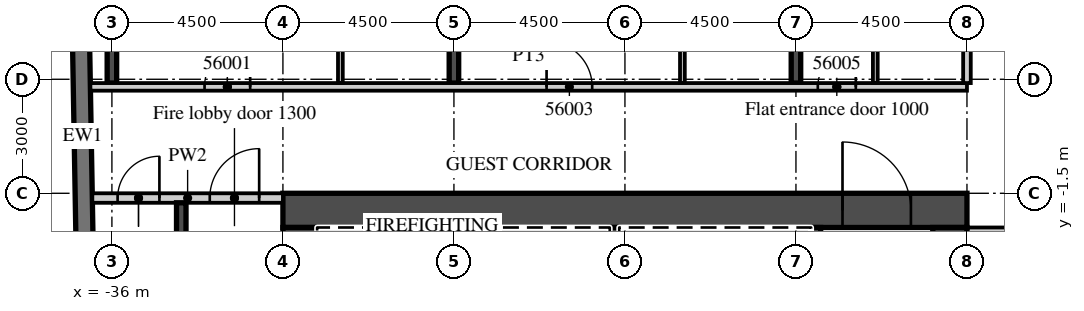
"""IFC4 building model, lengths in metres.
Left out: names, types, materials, properties, quantities, classifications, styles, units other than length and angle.
Written with IfcOpenShell. Run it as: python <this file> out.ifc"""

import sys

from ifc_helpers import new_model, si_unit, direction, frame, frame_2d, origin, place, context, subcontext, project, spatial, rectangle, extrude, element, fill, save


model = new_model("IFC4")
c1 = context("Model", 3, precision=1e-05, world=origin(), true_north=direction((0.0, 1.0)))
c2 = subcontext(c1, "Body", "Model", "MODEL_VIEW")
j1 = project(units=[si_unit("LENGTHUNIT", "METRE"), si_unit("PLANEANGLEUNIT", "RADIAN")], contexts=[c1])
p1 = place(None, origin())
s1 = spatial("IfcSite", under=j1, at=p1, CompositionType="ELEMENT")
p2 = place(p1, origin())
s2 = spatial("IfcBuilding", under=s1, at=p2, CompositionType="ELEMENT")
p3 = place(p2, frame((0.0, 0.0, 230.9)))
s3 = spatial("IfcBuildingStorey", under=s2, at=p3, CompositionType="ELEMENT", Elevation=230.9)
p4 = place(p3, frame((-36.0, 1.4, 0.0), z_axis=(0.0, 0.0, 1.0), x_axis=(0.0, 1.0, 0.0)))
e1 = element("IfcWall", 1, at=p4, inside=s3, PredefinedType="SHEAR", context=c2, shape_type="SweptSolid", body=[
    extrude(rectangle(XDim=17.125, YDim=0.25, at=frame_2d((8.563, 0.0))), origin(), (0.0, 0.0, 1.0), 3.3),
])
p5 = place(p3, frame((-27.0, 1.4, 0.0), z_axis=(0.0, 0.0, 1.0), x_axis=(0.0, 1.0, 0.0)))
e2 = element("IfcWall", 2, at=p5, inside=s3, PredefinedType="SHEAR", context=c2, shape_type="SweptSolid", body=[
    extrude(rectangle(XDim=18.817, YDim=0.25, at=frame_2d((9.409, 0.0))), origin(), (0.0, 0.0, 1.0), 3.3),
])
p6 = place(p3, frame((-18.0, 1.4, 0.0), z_axis=(0.0, 0.0, 1.0), x_axis=(0.0, 1.0, 0.0)))
e3 = element("IfcWall", 3, at=p6, inside=s3, PredefinedType="SHEAR", context=c2, shape_type="SweptSolid", body=[
    extrude(rectangle(XDim=18.974, YDim=0.25, at=frame_2d((9.487, 0.0))), origin(), (0.0, 0.0, 1.0), 3.3),
])
p7 = place(p3, frame((-37.057, 16.503, 0.0), z_axis=(0.0, 0.0, 1.0), x_axis=(0.017452279857, -0.999847697366, 0.0)))
e4 = element("IfcWall", 4, at=p7, inside=s3, PredefinedType="SOLIDWALL", context=c2, shape_type="SweptSolid", body=[
    extrude(rectangle(XDim=33.0, YDim=0.45, at=frame_2d((16.5, 0.0))), origin(), (0.0, 0.0, 1.0), 3.02),
])
p8 = place(p3, frame((-36.566, 1.3, 0.0), z_axis=(0.0, 0.0, 1.0), x_axis=(1.0, 0.0, 0.0)))
e5 = element("IfcWall", 5, at=p8, inside=s3, PredefinedType="PARTITIONING", context=c2, shape_type="SweptSolid", body=[
    extrude(rectangle(XDim=23.066, YDim=0.2, at=frame_2d((11.533, 0.0))), origin(), (0.0, 0.0, 1.0), 3.02),
])
p9 = place(p8, frame((3.004, 0.0, 0.0)))
e6 = element("IfcOpeningElement", 6, at=p9, cuts=e5, PredefinedType="OPENING", context=c2, shape_type="SweptSolid", body=[
    extrude(rectangle(XDim=1.2, YDim=2.1, at=frame_2d((0.6, 1.05))), frame((0.0, 0.11, 0.0), z_axis=(0.0, -1.0, 0.0), x_axis=(1.0, 0.0, 0.0)), (0.0, 0.0, 1.0), 0.22),
])
p10 = place(p8, frame((12.004, 0.0, 0.0)))
e7 = element("IfcOpeningElement", 7, at=p10, cuts=e5, PredefinedType="OPENING", context=c2, shape_type="SweptSolid", body=[
    extrude(rectangle(XDim=1.2, YDim=2.1, at=frame_2d((0.6, 1.05))), frame((0.0, 0.11, 0.0), z_axis=(0.0, -1.0, 0.0), x_axis=(1.0, 0.0, 0.0)), (0.0, 0.0, 1.0), 0.22),
])
p11 = place(p8, frame((19.141, 0.0, 0.0)))
e8 = element("IfcOpeningElement", 8, at=p11, cuts=e5, PredefinedType="OPENING", context=c2, shape_type="SweptSolid", body=[
    extrude(rectangle(XDim=1.0, YDim=2.1, at=frame_2d((0.5, 1.05))), frame((0.0, 0.11, 0.0), z_axis=(0.0, -1.0, 0.0), x_axis=(1.0, 0.0, 0.0)), (0.0, 0.0, 1.0), 0.22),
])
p12 = place(p3, frame((-29.988, 1.4, 0.0), z_axis=(0.0, 0.0, 1.0), x_axis=(0.0, 1.0, 0.0)))
e9 = element("IfcWall", 9, at=p12, inside=s3, PredefinedType="PARTITIONING", context=c2, shape_type="SweptSolid", body=[
    extrude(rectangle(XDim=5.725, YDim=0.125, at=frame_2d((2.863, 0.0))), origin(), (0.0, 0.0, 1.0), 3.02),
])
p13 = place(p12, frame((2.45, 0.0, 0.0)))
e10 = element("IfcOpeningElement", 10, at=p13, cuts=e9, PredefinedType="OPENING", context=c2, shape_type="SweptSolid", body=[
    extrude(rectangle(XDim=0.9, YDim=2.1, at=frame_2d((0.45, 1.05))), frame((0.0, 0.073, 0.0), z_axis=(0.0, -1.0, 0.0), x_axis=(1.0, 0.0, 0.0)), (0.0, 0.0, 1.0), 0.145),
])
p14 = place(p3, frame((-20.988, 1.4, 0.0), z_axis=(0.0, 0.0, 1.0), x_axis=(0.0, 1.0, 0.0)))
e11 = element("IfcWall", 11, at=p14, inside=s3, PredefinedType="PARTITIONING", context=c2, shape_type="SweptSolid", body=[
    extrude(rectangle(XDim=5.725, YDim=0.125, at=frame_2d((2.863, 0.0))), origin(), (0.0, 0.0, 1.0), 3.02),
])
p15 = place(p14, frame((2.45, 0.0, 0.0)))
e12 = element("IfcOpeningElement", 12, at=p15, cuts=e11, PredefinedType="OPENING", context=c2, shape_type="SweptSolid", body=[
    extrude(rectangle(XDim=0.9, YDim=2.1, at=frame_2d((0.45, 1.05))), frame((0.0, 0.073, 0.0), z_axis=(0.0, -1.0, 0.0), x_axis=(1.0, 0.0, 0.0)), (0.0, 0.0, 1.0), 0.145),
])
p16 = place(p3, frame((-13.5, 1.4, 0.0), z_axis=(0.0, 0.0, 1.0), x_axis=(0.0, 1.0, 0.0)))
e13 = element("IfcWall", 13, at=p16, inside=s3, PredefinedType="PARTITIONING", context=c2, shape_type="SweptSolid", body=[
    extrude(rectangle(XDim=19.065, YDim=0.2, at=frame_2d((9.533, 0.0))), origin(), (0.0, 0.0, 1.0), 3.02),
])
p17 = place(p3, frame((-15.912, 1.4, 0.0), z_axis=(0.0, 0.0, 1.0), x_axis=(0.0, 1.0, 0.0)))
e14 = element("IfcWall", 14, at=p17, inside=s3, PredefinedType="PARTITIONING", context=c2, shape_type="SweptSolid", body=[
    extrude(rectangle(XDim=5.725, YDim=0.125, at=frame_2d((2.863, 0.0))), origin(), (0.0, 0.0, 1.0), 3.02),
])
p18 = place(p17, frame((2.45, 0.0, 0.0)))
e15 = element("IfcOpeningElement", 15, at=p18, cuts=e14, PredefinedType="OPENING", context=c2, shape_type="SweptSolid", body=[
    extrude(rectangle(XDim=0.9, YDim=2.1, at=frame_2d((0.45, 1.05))), frame((0.0, 0.073, 0.0), z_axis=(0.0, -1.0, 0.0), x_axis=(1.0, 0.0, 0.0)), (0.0, 0.0, 1.0), 0.145),
])
p19 = place(p3, frame((-13.5, -2.5, 0.0), z_axis=(0.0, 0.0, 1.0), x_axis=(1.0, 0.0, 0.0)))
e16 = element("IfcWall", 16, at=p19, inside=s3, PredefinedType="PARTITIONING", context=c2, shape_type="SweptSolid", body=[
    extrude(rectangle(XDim=27.0, YDim=0.2, at=frame_2d((13.5, 0.0))), origin(), (0.0, 0.0, 1.0), 3.02),
])
p20 = place(p19, frame((2.925, 0.0, 0.0)))
e17 = element("IfcOpeningElement", 17, at=p20, cuts=e16, PredefinedType="OPENING", context=c2, shape_type="SweptSolid", body=[
    extrude(rectangle(XDim=1.0, YDim=2.1, at=frame_2d((0.5, 1.05))), frame((0.0, 0.11, 0.0), z_axis=(0.0, -1.0, 0.0), x_axis=(1.0, 0.0, 0.0)), (0.0, 0.0, 1.0), 0.22),
])
p21 = place(p19, frame((9.863, 0.0, 0.0)))
e18 = element("IfcOpeningElement", 18, at=p21, cuts=e16, PredefinedType="OPENING", context=c2, shape_type="SweptSolid", body=[
    extrude(rectangle(XDim=1.2, YDim=2.1, at=frame_2d((0.6, 1.05))), frame((0.0, 0.11, 0.0), z_axis=(0.0, -1.0, 0.0), x_axis=(1.0, 0.0, 0.0)), (0.0, 0.0, 1.0), 0.22),
])
p22 = place(p19, frame((16.45, 0.0, 0.0)))
e19 = element("IfcOpeningElement", 19, at=p22, cuts=e16, PredefinedType="OPENING", context=c2, shape_type="SweptSolid", body=[
    extrude(rectangle(XDim=1.0, YDim=2.1, at=frame_2d((0.5, 1.05))), frame((0.0, 0.11, 0.0), z_axis=(0.0, -1.0, 0.0), x_axis=(1.0, 0.0, 0.0)), (0.0, 0.0, 1.0), 0.22),
])
p23 = place(p19, frame((20.925, 0.0, 0.0)))
e20 = element("IfcOpeningElement", 20, at=p23, cuts=e16, PredefinedType="OPENING", context=c2, shape_type="SweptSolid", body=[
    extrude(rectangle(XDim=1.0, YDim=2.1, at=frame_2d((0.5, 1.05))), frame((0.0, 0.11, 0.0), z_axis=(0.0, -1.0, 0.0), x_axis=(1.0, 0.0, 0.0)), (0.0, 0.0, 1.0), 0.22),
])
p24 = place(p19, frame((25.425, 0.0, 0.0)))
e21 = element("IfcOpeningElement", 21, at=p24, cuts=e16, PredefinedType="OPENING", context=c2, shape_type="SweptSolid", body=[
    extrude(rectangle(XDim=1.0, YDim=2.1, at=frame_2d((0.5, 1.05))), frame((0.0, 0.11, 0.0), z_axis=(0.0, -1.0, 0.0), x_axis=(1.0, 0.0, 0.0)), (0.0, 0.0, 1.0), 0.22),
])
p25 = place(p3, frame((-31.5, -1.95, 0.0), z_axis=(0.0, 0.0, 1.0), x_axis=(1.0, 0.0, 0.0)))
e22 = element("IfcWall", 22, at=p25, inside=s3, PredefinedType="SHEAR", context=c2, shape_type="SweptSolid", body=[
    extrude(rectangle(XDim=18.0, YDim=0.9, at=frame_2d((9.0, 0.0))), origin(), (0.0, 0.0, 1.0), 3.02),
])
p26 = place(p25, frame((14.725, 0.0, 0.0)))
e23 = element("IfcOpeningElement", 23, at=p26, cuts=e22, PredefinedType="OPENING", context=c2, shape_type="SweptSolid", body=[
    extrude(rectangle(XDim=1.8, YDim=2.1, at=frame_2d((0.9, 1.05))), frame((0.0, 0.46, 0.0), z_axis=(0.0, -1.0, 0.0), x_axis=(1.0, 0.0, 0.0)), (0.0, 0.0, 1.0), 0.92),
])
p27 = place(p3, frame((-31.05, -15.2, 0.0), z_axis=(0.0, 0.0, 1.0), x_axis=(0.0, 1.0, 0.0)))
e24 = element("IfcWall", 24, at=p27, inside=s3, PredefinedType="SHEAR", context=c2, shape_type="SweptSolid", body=[
    extrude(rectangle(XDim=12.8, YDim=0.9, at=frame_2d((6.4, 0.0))), origin(), (0.0, 0.0, 1.0), 3.02),
])
p28 = place(p27, frame((11.5, 0.0, 0.0)))
e25 = element("IfcOpeningElement", 25, at=p28, cuts=e24, PredefinedType="OPENING", context=c2, shape_type="SweptSolid", body=[
    extrude(rectangle(XDim=1.1, YDim=2.1, at=frame_2d((0.55, 1.05))), frame((0.0, 0.46, 0.0), z_axis=(0.0, -1.0, 0.0), x_axis=(1.0, 0.0, 0.0)), (0.0, 0.0, 1.0), 0.92),
])
p29 = place(p3, frame((-13.95, -14.6, 0.0), z_axis=(0.0, 0.0, 1.0), x_axis=(0.0, 1.0, 0.0)))
e26 = element("IfcWall", 26, at=p29, inside=s3, PredefinedType="SHEAR", context=c2, shape_type="SweptSolid", body=[
    extrude(rectangle(XDim=12.2, YDim=0.9, at=frame_2d((6.1, 0.0))), origin(), (0.0, 0.0, 1.0), 3.02),
])
p30 = place(p3, frame((-17.475, -5.55, 0.0), z_axis=(0.0, 0.0, 1.0), x_axis=(0.0, 1.0, 0.0)))
e27 = element("IfcWall", 27, at=p30, inside=s3, PredefinedType="SHEAR", context=c2, shape_type="SweptSolid", body=[
    extrude(rectangle(XDim=3.15, YDim=0.25, at=frame_2d((1.575, 0.0))), origin(), (0.0, 0.0, 1.0), 3.02),
])
for number, where, z_axis, x_axis in (
    (28, (-27.975, -5.3, 0.0), (0.0, 0.0, 1.0), (0.0, 1.0, 0.0)),
    (29, (-22.775, -5.3, 0.0), (0.0, 0.0, 1.0), (0.0, 1.0, 0.0)),
):
    element("IfcWall", number, at=place(p3, frame(where, z_axis=z_axis, x_axis=x_axis)), inside=s3, PredefinedType="SHEAR", context=c2, shape_type="SweptSolid", body=[
        extrude(rectangle(XDim=2.9, YDim=0.25, at=frame_2d((1.45, 0.0))), origin(), (0.0, 0.0, 1.0), 3.02),
    ])
p31 = place(p3, frame((-36.515, -1.625, 0.0), z_axis=(0.0, 0.0, 1.0), x_axis=(1.0, 0.0, 0.0)))
e30 = element("IfcWall", 30, at=p31, inside=s3, PredefinedType="PARTITIONING", context=c2, shape_type="SweptSolid", body=[
    extrude(rectangle(XDim=5.015, YDim=0.25, at=frame_2d((2.508, 0.0))), origin(), (0.0, 0.0, 1.0), 3.02),
])
p32 = place(p31, frame((3.09, 0.0, 0.0)))
e31 = element("IfcOpeningElement", 31, at=p32, cuts=e30, PredefinedType="OPENING", context=c2, shape_type="SweptSolid", body=[
    extrude(rectangle(XDim=1.3, YDim=2.1, at=frame_2d((0.65, 1.05))), frame((0.0, 0.135, 0.0), z_axis=(0.0, -1.0, 0.0), x_axis=(1.0, 0.0, 0.0)), (0.0, 0.0, 1.0), 0.27),
])
p33 = place(p31, frame((0.665, 0.0, 0.0)))
e32 = element("IfcOpeningElement", 32, at=p33, cuts=e30, PredefinedType="OPENING", context=c2, shape_type="SweptSolid", body=[
    extrude(rectangle(XDim=1.1, YDim=2.1, at=frame_2d((0.55, 1.05))), frame((0.0, 0.135, 0.0), z_axis=(0.0, -1.0, 0.0), x_axis=(1.0, 0.0, 0.0)), (0.0, 0.0, 1.0), 0.27),
])
p34 = place(p3, frame((-34.175, -10.1, 0.0), z_axis=(0.0, 0.0, 1.0), x_axis=(0.0, 1.0, 0.0)))
e33 = element("IfcWall", 33, at=p34, inside=s3, PredefinedType="SHEAR", context=c2, shape_type="SweptSolid", body=[
    extrude(rectangle(XDim=8.35, YDim=0.25, at=frame_2d((4.175, 0.0))), origin(), (0.0, 0.0, 1.0), 3.02),
])
p35 = place(p9, origin())
e34 = element("IfcDoor", 34, at=p35, inside=s3, OperationType="SINGLE_SWING_RIGHT", PredefinedType="DOOR", context=c2, shape_type="SweptSolid", body=[
    extrude(rectangle(XDim=1.2, YDim=2.1, at=frame_2d((0.6, 1.05))), frame((0.0, 0.025, 0.0), z_axis=(0.0, -1.0, 0.0), x_axis=(1.0, 0.0, 0.0)), (0.0, 0.0, 1.0), 0.05),
])
fill(e6, e34)
p36 = place(p10, origin())
e35 = element("IfcDoor", 35, at=p36, inside=s3, OperationType="SINGLE_SWING_LEFT", PredefinedType="DOOR", context=c2, shape_type="SweptSolid", body=[
    extrude(rectangle(XDim=1.2, YDim=2.1, at=frame_2d((0.6, 1.05))), frame((0.0, 0.025, 0.0), z_axis=(0.0, -1.0, 0.0), x_axis=(1.0, 0.0, 0.0)), (0.0, 0.0, 1.0), 0.05),
])
fill(e7, e35)
p37 = place(p11, origin())
e36 = element("IfcDoor", 36, at=p37, inside=s3, OperationType="SINGLE_SWING_RIGHT", PredefinedType="DOOR", context=c2, shape_type="SweptSolid", body=[
    extrude(rectangle(XDim=1.0, YDim=2.1, at=frame_2d((0.5, 1.05))), frame((0.0, 0.025, 0.0), z_axis=(0.0, -1.0, 0.0), x_axis=(1.0, 0.0, 0.0)), (0.0, 0.0, 1.0), 0.05),
])
fill(e8, e36)
p38 = place(p26, origin())
e37 = element("IfcDoor", 37, at=p38, inside=s3, OperationType="DOUBLE_DOOR_DOUBLE_SWING", PredefinedType="DOOR", context=c2, shape_type="SweptSolid", body=[
    extrude(rectangle(XDim=1.8, YDim=2.1, at=frame_2d((0.9, 1.05))), frame((0.0, 0.025, 0.0), z_axis=(0.0, -1.0, 0.0), x_axis=(1.0, 0.0, 0.0)), (0.0, 0.0, 1.0), 0.05),
])
fill(e23, e37)
p39 = place(p32, origin())
e38 = element("IfcDoor", 38, at=p39, inside=s3, OperationType="SINGLE_SWING_RIGHT", PredefinedType="DOOR", context=c2, shape_type="SweptSolid", body=[
    extrude(rectangle(XDim=1.3, YDim=2.1, at=frame_2d((0.65, 1.05))), frame((0.0, 0.025, 0.0), z_axis=(0.0, -1.0, 0.0), x_axis=(1.0, 0.0, 0.0)), (0.0, 0.0, 1.0), 0.05),
])
fill(e31, e38)
p40 = place(p33, origin())
e39 = element("IfcDoor", 39, at=p40, inside=s3, OperationType="SINGLE_SWING_RIGHT", PredefinedType="DOOR", context=c2, shape_type="SweptSolid", body=[
    extrude(rectangle(XDim=1.1, YDim=2.1, at=frame_2d((0.55, 1.05))), frame((0.0, 0.025, 0.0), z_axis=(0.0, -1.0, 0.0), x_axis=(1.0, 0.0, 0.0)), (0.0, 0.0, 1.0), 0.05),
])
fill(e32, e39)
save(model, sys.argv[1])
